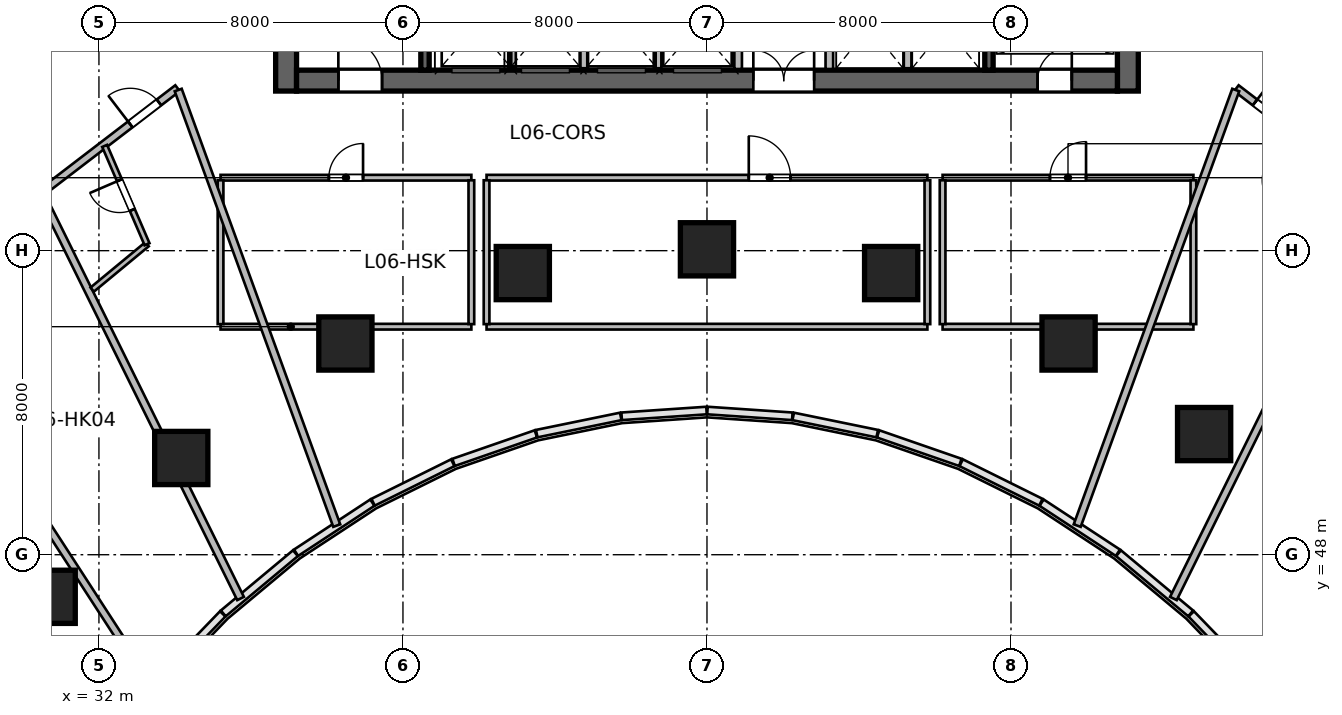
"""IFC4 building model, lengths in metres.
Left out: names, types, materials, properties, quantities, classifications, styles, units other than length and angle.
Written with IfcOpenShell. Run it as: python <this file> out.ifc"""

import sys

from ifc_helpers import new_model, si_unit, direction, frame, frame_2d, origin, origin_2d, place, context, subcontext, project, spatial, rectangle, circle, extrude, source, transform, mapped, element, fill, save


model = new_model("IFC4")
c1 = context("Model", 3, precision=1e-05, world=origin(), true_north=direction((0.0, 1.0)))
c2 = subcontext(c1, "Body", "Model", "MODEL_VIEW")
j1 = project(units=[si_unit("LENGTHUNIT", "METRE"), si_unit("PLANEANGLEUNIT", "RADIAN")], contexts=[c1])
p1 = place(None, origin())
s1 = spatial("IfcSite", under=j1, at=p1, CompositionType="ELEMENT")
p2 = place(p1, origin())
s2 = spatial("IfcBuilding", under=s1, at=p2, CompositionType="ELEMENT")
p3 = place(p2, frame((0.0, 0.0, 35.4)))
s3 = spatial("IfcBuildingStorey", under=s2, at=p3, CompositionType="ELEMENT", Elevation=35.4)
m1 = source(origin(), c2, "Body", "SweptSolid", [
    extrude(rectangle(XDim=12.0, YDim=0.55, at=frame_2d((6.0, 0.0))), origin(), (0.0, 0.0, 1.0), 3.6),
])
for number, where, z_axis, x_axis in (
    (1, (36.925, 60.2, 0.0), (0.0, 0.0, 1.0), (0.0, 1.0, 0.0)),
    (2, (59.075, 60.2, 0.0), (0.0, 0.0, 1.0), (0.0, 1.0, 0.0)),
):
    element("IfcWall", number, at=place(p3, frame(where, z_axis=z_axis, x_axis=x_axis)), inside=s3, PredefinedType="SHEAR", context=c2, shape_type="MappedRepresentation", body=[
        mapped(m1, transform((0.0, 0.0, 0.0), scale=1.0)),
    ])
m2 = source(origin(), c2, "Body", "SweptSolid", [
    extrude(rectangle(XDim=21.6, YDim=0.55, at=frame_2d((10.8, 0.0))), origin(), (0.0, 0.0, 1.0), 3.6),
])
p4 = place(p3, frame((37.2, 60.475, 0.0), z_axis=(0.0, 0.0, 1.0), x_axis=(1.0, 0.0, 0.0)))
e3 = element("IfcWall", 3, at=p4, inside=s3, PredefinedType="SHEAR", context=c2, shape_type="MappedRepresentation", body=[
    mapped(m2, transform((0.0, 0.0, 0.0), scale=1.0)),
])
p5 = place(p4, frame((1.1, 0.0, 0.0)))
e4 = element("IfcOpeningElement", 4, at=p5, cuts=e3, PredefinedType="OPENING", context=c2, shape_type="SweptSolid", body=[
    extrude(rectangle(XDim=1.15, YDim=2.15, at=frame_2d((0.575, 1.075))), frame((0.0, 0.285, 0.0), z_axis=(0.0, -1.0, 0.0), x_axis=(1.0, 0.0, 0.0)), (0.0, 0.0, 1.0), 0.57),
])
p6 = place(p4, frame((19.5, 0.0, 0.0)))
e5 = element("IfcOpeningElement", 5, at=p6, cuts=e3, PredefinedType="OPENING", context=c2, shape_type="SweptSolid", body=[
    extrude(rectangle(XDim=0.9, YDim=2.1, at=frame_2d((0.45, 1.05))), frame((0.0, 0.285, 0.0), z_axis=(0.0, -1.0, 0.0), x_axis=(1.0, 0.0, 0.0)), (0.0, 0.0, 1.0), 0.57),
])
p7 = place(p4, frame((12.02, 0.0, 0.0)))
e6 = element("IfcOpeningElement", 6, at=p7, cuts=e3, PredefinedType="OPENING", context=c2, shape_type="SweptSolid", body=[
    extrude(rectangle(XDim=1.6, YDim=2.15, at=frame_2d((0.8, 1.075))), frame((0.0, 0.285, 0.0), z_axis=(0.0, -1.0, 0.0), x_axis=(1.0, 0.0, 0.0)), (0.0, 0.0, 1.0), 0.57),
])
m3 = source(origin(), c2, "Body", "SweptSolid", [
    extrude(rectangle(XDim=10.9, YDim=0.22, at=frame_2d((5.45, 0.0))), origin(), (0.0, 0.0, 1.0), 3.6),
])
p8 = place(p3, frame((40.58, 60.75, 0.0), z_axis=(0.0, 0.0, 1.0), x_axis=(0.0, 1.0, 0.0)))
e7 = element("IfcWall", 7, at=p8, inside=s3, PredefinedType="SHEAR", context=c2, shape_type="MappedRepresentation", body=[
    mapped(m3, transform((0.0, 0.0, 0.0), scale=1.0)),
])
p9 = place(p3, frame((55.42, 60.75, 0.0), z_axis=(0.0, 0.0, 1.0), x_axis=(0.0, 1.0, 0.0)))
e8 = element("IfcWall", 8, at=p9, inside=s3, PredefinedType="SHEAR", context=c2, shape_type="MappedRepresentation", body=[
    mapped(m3, transform((0.0, 0.0, 0.0), scale=1.0)),
])
p10 = place(p9, frame((9.495, 0.0, 0.0)))
e9 = element("IfcOpeningElement", 9, at=p10, cuts=e8, PredefinedType="OPENING", context=c2, shape_type="SweptSolid", body=[
    extrude(rectangle(XDim=1.15, YDim=2.15, at=frame_2d((0.575, 1.075))), frame((0.0, 0.12, 0.0), z_axis=(0.0, -1.0, 0.0), x_axis=(1.0, 0.0, 0.0)), (0.0, 0.0, 1.0), 0.24),
])
m4 = source(origin(), c2, "Body", "SweptSolid", [
    extrude(circle(Radius=0.7, at=origin_2d()), origin(), (0.0, 0.0, 1.0), 3.6),
])
for number, where, z_axis, x_axis in (
    (10, (30.677, 46.892, 0.0), (0.0, 0.0, 1.0), (-0.571, 0.821, 0.0)),
    (11, (34.166, 50.545, 0.0), (0.0, 0.0, 1.0), (-0.436, 0.9, 0.0)),
    (12, (38.485, 53.558, 0.0), (0.0, 0.0, 1.0), (-0.289, 0.957, 0.0)),
    (13, (43.154, 55.411, 0.0), (0.0, 0.0, 1.0), (-0.143, 0.99, 0.0)),
    (14, (48.0, 56.036, 0.0), (0.0, 0.0, 1.0), (0.0, 1.0, 0.0)),
    (15, (52.846, 55.411, 0.0), (0.0, 0.0, 1.0), (0.143, 0.99, 0.0)),
    (16, (57.515, 53.558, 0.0), (0.0, 0.0, 1.0), (0.289, 0.957, 0.0)),
    (17, (61.082, 51.175, 0.0), (0.0, 0.0, 1.0), (0.409, 0.912, 0.0)),
):
    element("IfcColumn", number, at=place(p3, frame(where, z_axis=z_axis, x_axis=x_axis)), inside=s3, PredefinedType="COLUMN", context=c2, shape_type="MappedRepresentation", body=[
        mapped(m4, transform((0.0, 0.0, 0.0), scale=1.0)),
    ])
m5 = source(origin(), c2, "Body", "SweptSolid", [
    extrude(rectangle(XDim=2.24, YDim=0.2, at=frame_2d((1.12, 0.0))), origin(), (0.0, 0.0, 1.0), 3.36),
])
for number, where, z_axis, x_axis in (
    (18, (48.82, 60.78, 0.0), (0.0, 0.0, 1.0), (0.0, 1.0, 0.0)),
    (19, (51.22, 60.78, 0.0), (0.0, 0.0, 1.0), (0.0, 1.0, 0.0)),
):
    element("IfcWall", number, at=place(p3, frame(where, z_axis=z_axis, x_axis=x_axis)), inside=s3, PredefinedType="SOLIDWALL", context=c2, shape_type="MappedRepresentation", body=[
        mapped(m5, transform((0.0, 0.0, 0.0), scale=1.0)),
    ])
m6 = source(origin(), c2, "Body", "SweptSolid", [
    extrude(rectangle(XDim=2.2, YDim=0.2, at=frame_2d((1.1, 0.0))), origin(), (0.0, 0.0, 1.0), 3.36),
])
for number, where, z_axis, x_axis in (
    (20, (42.87, 60.8, 0.0), (0.0, 0.0, 1.0), (0.0, 1.0, 0.0)),
    (21, (44.77, 60.8, 0.0), (0.0, 0.0, 1.0), (0.0, 1.0, 0.0)),
    (22, (46.7, 60.8, 0.0), (0.0, 0.0, 1.0), (0.0, 1.0, 0.0)),
    (23, (53.28, 60.8, 0.0), (0.0, 0.0, 1.0), (0.0, 1.0, 0.0)),
):
    element("IfcWall", number, at=place(p3, frame(where, z_axis=z_axis, x_axis=x_axis)), inside=s3, PredefinedType="SOLIDWALL", context=c2, shape_type="MappedRepresentation", body=[
        mapped(m6, transform((0.0, 0.0, 0.0), scale=1.0)),
    ])
m7 = source(origin(), c2, "Body", "SweptSolid", [
    extrude(rectangle(XDim=6.6, YDim=0.15, at=frame_2d((3.3, 0.0))), origin(), (0.0, 0.0, 1.0), 2.803),
])
p11 = place(p3, frame((35.2, 54.0, 0.0), z_axis=(0.0, 0.0, 1.0), x_axis=(1.0, 0.0, 0.0)))
e24 = element("IfcWall", 24, at=p11, inside=s3, PredefinedType="PARTITIONING", context=c2, shape_type="MappedRepresentation", body=[
    mapped(m7, transform((0.0, 0.0, 0.0), scale=1.0)),
])
m8 = source(origin(), c2, "Body", "SweptSolid", [
    extrude(rectangle(XDim=6.6, YDim=0.15, at=frame_2d((3.3, 0.0))), origin(), (0.0, 0.0, 1.0), 3.36),
])
p12 = place(p3, frame((35.2, 57.92, 0.0), z_axis=(0.0, 0.0, 1.0), x_axis=(1.0, 0.0, 0.0)))
e25 = element("IfcWall", 25, at=p12, inside=s3, PredefinedType="PARTITIONING", context=c2, shape_type="MappedRepresentation", body=[
    mapped(m8, transform((0.0, 0.0, 0.0), scale=1.0)),
])
p13 = place(p12, frame((2.85, 0.0, 0.0)))
e26 = element("IfcOpeningElement", 26, at=p13, cuts=e25, PredefinedType="OPENING", context=c2, shape_type="SweptSolid", body=[
    extrude(rectangle(XDim=0.9, YDim=2.1, at=frame_2d((0.45, 1.05))), frame((0.0, 0.085, 0.0), z_axis=(0.0, -1.0, 0.0), x_axis=(1.0, 0.0, 0.0)), (0.0, 0.0, 1.0), 0.17),
])
m9 = source(origin(), c2, "Body", "SweptSolid", [
    extrude(rectangle(XDim=3.785, YDim=0.15, at=frame_2d((1.893, 0.0))), origin(), (0.0, 0.0, 1.0), 3.36),
])
for number, where, z_axis, x_axis in (
    (27, (35.2, 54.067, 0.0), (0.0, 0.0, 1.0), (0.0, 1.0, 0.0)),
    (28, (41.8, 54.067, 0.0), (0.0, 0.0, 1.0), (0.0, 1.0, 0.0)),
):
    element("IfcWall", number, at=place(p3, frame(where, z_axis=z_axis, x_axis=x_axis)), inside=s3, PredefinedType="PARTITIONING", context=c2, shape_type="MappedRepresentation", body=[
        mapped(m9, transform((0.0, 0.0, 0.0), scale=1.0)),
    ])
m10 = source(origin(), c2, "Body", "SweptSolid", [
    extrude(rectangle(XDim=11.6, YDim=0.15, at=frame_2d((5.8, 0.0))), origin(), (0.0, 0.0, 1.0), 3.36),
])
p14 = place(p3, frame((42.2, 54.0, 0.0), z_axis=(0.0, 0.0, 1.0), x_axis=(1.0, 0.0, 0.0)))
e29 = element("IfcWall", 29, at=p14, inside=s3, PredefinedType="PARTITIONING", context=c2, shape_type="MappedRepresentation", body=[
    mapped(m10, transform((0.0, 0.0, 0.0), scale=1.0)),
])
p15 = place(p3, frame((42.2, 57.92, 0.0), z_axis=(0.0, 0.0, 1.0), x_axis=(1.0, 0.0, 0.0)))
e30 = element("IfcWall", 30, at=p15, inside=s3, PredefinedType="PARTITIONING", context=c2, shape_type="MappedRepresentation", body=[
    mapped(m10, transform((0.0, 0.0, 0.0), scale=1.0)),
])
p16 = place(p15, frame((6.9, 0.0, 0.0)))
e31 = element("IfcOpeningElement", 31, at=p16, cuts=e30, PredefinedType="OPENING", context=c2, shape_type="SweptSolid", body=[
    extrude(rectangle(XDim=1.1, YDim=2.15, at=frame_2d((0.55, 1.075))), frame((0.0, 0.085, 0.0), z_axis=(0.0, -1.0, 0.0), x_axis=(1.0, 0.0, 0.0)), (0.0, 0.0, 1.0), 0.17),
])
for number, where, z_axis, x_axis in (
    (32, (42.2, 54.067, 0.0), (0.0, 0.0, 1.0), (0.0, 1.0, 0.0)),
    (33, (53.8, 54.067, 0.0), (0.0, 0.0, 1.0), (0.0, 1.0, 0.0)),
):
    element("IfcWall", number, at=place(p3, frame(where, z_axis=z_axis, x_axis=x_axis)), inside=s3, PredefinedType="PARTITIONING", context=c2, shape_type="MappedRepresentation", body=[
        mapped(m9, transform((0.0, 0.0, 0.0), scale=1.0)),
    ])
p17 = place(p3, frame((54.2, 54.0, 0.0), z_axis=(0.0, 0.0, 1.0), x_axis=(1.0, 0.0, 0.0)))
e34 = element("IfcWall", 34, at=p17, inside=s3, PredefinedType="PARTITIONING", context=c2, shape_type="MappedRepresentation", body=[
    mapped(m7, transform((0.0, 0.0, 0.0), scale=1.0)),
])
p18 = place(p3, frame((54.2, 57.92, 0.0), z_axis=(0.0, 0.0, 1.0), x_axis=(1.0, 0.0, 0.0)))
e35 = element("IfcWall", 35, at=p18, inside=s3, PredefinedType="PARTITIONING", context=c2, shape_type="MappedRepresentation", body=[
    mapped(m8, transform((0.0, 0.0, 0.0), scale=1.0)),
])
p19 = place(p18, frame((2.825, 0.0, 0.0)))
e36 = element("IfcOpeningElement", 36, at=p19, cuts=e35, PredefinedType="OPENING", context=c2, shape_type="SweptSolid", body=[
    extrude(rectangle(XDim=0.95, YDim=2.1, at=frame_2d((0.475, 1.05))), frame((0.0, 0.085, 0.0), z_axis=(0.0, -1.0, 0.0), x_axis=(1.0, 0.0, 0.0)), (0.0, 0.0, 1.0), 0.17),
])
for number, where, z_axis, x_axis in (
    (37, (54.2, 54.067, 0.0), (0.0, 0.0, 1.0), (0.0, 1.0, 0.0)),
    (38, (60.8, 54.067, 0.0), (0.0, 0.0, 1.0), (0.0, 1.0, 0.0)),
):
    element("IfcWall", number, at=place(p3, frame(where, z_axis=z_axis, x_axis=x_axis)), inside=s3, PredefinedType="PARTITIONING", context=c2, shape_type="MappedRepresentation", body=[
        mapped(m9, transform((0.0, 0.0, 0.0), scale=1.0)),
    ])
m11 = source(origin(), c2, "Body", "SweptSolid", [
    extrude(rectangle(XDim=11.053, YDim=0.195, at=frame_2d((5.527, 0.0))), origin(), (0.0, 0.0, 1.0), 3.36),
])
p20 = place(p3, frame((31.466, 41.949, 0.0), z_axis=(0.0, 0.0, 1.0), x_axis=(-0.638131235571, 0.769927611005, 0.0)))
e39 = element("IfcWall", 39, at=p20, inside=s3, PredefinedType="PARTITIONING", context=c2, shape_type="MappedRepresentation", body=[
    mapped(m11, transform((0.0, 0.0, 0.0), scale=1.0)),
])
m12 = source(origin(), c2, "Body", "SweptSolid", [
    extrude(rectangle(XDim=11.429, YDim=0.195, at=frame_2d((5.714, 0.0))), origin(), (0.0, 0.0, 1.0), 3.36),
])
p21 = place(p3, frame((33.396, 44.511, 0.0), z_axis=(0.0, 0.0, 1.0), x_axis=(-0.544215487077, 0.838945471187, 0.0)))
e40 = element("IfcWall", 40, at=p21, inside=s3, PredefinedType="PARTITIONING", context=c2, shape_type="MappedRepresentation", body=[
    mapped(m12, transform((0.0, 0.0, 0.0), scale=1.0)),
])
m13 = source(origin(), c2, "Body", "SweptSolid", [
    extrude(rectangle(XDim=11.844, YDim=0.195, at=frame_2d((5.922, 0.0))), origin(), (0.0, 0.0, 1.0), 2.644),
])
p22 = place(p3, frame((35.727, 46.848, 0.0), z_axis=(0.0, 0.0, 1.0), x_axis=(-0.442871152218, 0.896585267854, 0.0)))
e41 = element("IfcWall", 41, at=p22, inside=s3, PredefinedType="PARTITIONING", context=c2, shape_type="MappedRepresentation", body=[
    mapped(m13, transform((0.0, 0.0, 0.0), scale=1.0)),
])
m14 = source(origin(), c2, "Body", "SweptSolid", [
    extrude(rectangle(XDim=4.895, YDim=0.195, at=frame_2d((2.447, 0.0))), origin(), (0.0, 0.0, 1.0), 3.36),
])
p23 = place(p3, frame((29.113, 60.238, 0.0), z_axis=(0.0, 0.0, 1.0), x_axis=(0.793896075849, 0.608053468661, 0.0)))
e42 = element("IfcWall", 42, at=p23, inside=s3, PredefinedType="PARTITIONING", context=c2, shape_type="MappedRepresentation", body=[
    mapped(m14, transform((0.0, 0.0, 0.0), scale=1.0)),
])
p24 = place(p23, frame((3.245, 0.0, 0.0)))
e43 = element("IfcOpeningElement", 43, at=p24, cuts=e42, PredefinedType="OPENING", context=c2, shape_type="SweptSolid", body=[
    extrude(rectangle(XDim=0.95, YDim=2.15, at=frame_2d((0.475, 1.075))), frame((0.0, 0.107, 0.0), z_axis=(0.0, -1.0, 0.0), x_axis=(1.0, 0.0, 0.0)), (0.0, 0.0, 1.0), 0.215),
])
m15 = source(origin(), c2, "Body", "SweptSolid", [
    extrude(rectangle(XDim=4.546, YDim=0.195, at=frame_2d((2.273, 0.0))), origin(), (0.0, 0.0, 1.0), 3.36),
])
p25 = place(p3, frame((30.459, 57.511, 0.0), z_axis=(0.0, 0.0, 1.0), x_axis=(0.793907931297, 0.608037989457, 0.0)))
e44 = element("IfcWall", 44, at=p25, inside=s3, PredefinedType="PARTITIONING", context=c2, shape_type="MappedRepresentation", body=[
    mapped(m15, transform((0.0, 0.0, 0.0), scale=1.0)),
])
p26 = place(p25, frame((2.98, 0.0, 0.0)))
e45 = element("IfcOpeningElement", 45, at=p26, cuts=e44, PredefinedType="OPENING", context=c2, shape_type="SweptSolid", body=[
    extrude(rectangle(XDim=0.95, YDim=2.15, at=frame_2d((0.475, 1.075))), frame((0.0, 0.107, 0.0), z_axis=(0.0, -1.0, 0.0), x_axis=(1.0, 0.0, 0.0)), (0.0, 0.0, 1.0), 0.215),
])
m16 = source(origin(), c2, "Body", "SweptSolid", [
    extrude(rectangle(XDim=12.196, YDim=0.195, at=frame_2d((6.098, 0.0))), origin(), (0.0, 0.0, 1.0), 3.36),
])
p27 = place(p3, frame((38.258, 48.766, 0.0), z_axis=(0.0, 0.0, 1.0), x_axis=(-0.342022711534, 0.939691686031, 0.0)))
e46 = element("IfcWall", 46, at=p27, inside=s3, PredefinedType="PARTITIONING", context=c2, shape_type="MappedRepresentation", body=[
    mapped(m16, transform((0.0, 0.0, 0.0), scale=1.0)),
])
m17 = source(origin(), c2, "Body", "SweptSolid", [
    extrude(rectangle(XDim=1.873, YDim=0.14, at=frame_2d((0.937, 0.0))), origin(), (0.0, 0.0, 1.0), 3.36),
])
p28 = place(p3, frame((31.823, 54.976, 0.0), z_axis=(0.0, 0.0, 1.0), x_axis=(0.77069451688, 0.637204803537, 0.0)))
e47 = element("IfcWall", 47, at=p28, inside=s3, PredefinedType="PARTITIONING", context=c2, shape_type="MappedRepresentation", body=[
    mapped(m17, transform((0.0, 0.0, 0.0), scale=1.0)),
])
m18 = source(origin(), c2, "Body", "SweptSolid", [
    extrude(rectangle(XDim=2.817, YDim=0.14, at=frame_2d((1.409, 0.0))), origin(), (0.0, 0.0, 1.0), 3.36),
])
p29 = place(p3, frame((33.266, 56.169, 0.0), z_axis=(0.0, 0.0, 1.0), x_axis=(-0.395999429727, 0.918250756415, 0.0)))
e48 = element("IfcWall", 48, at=p29, inside=s3, PredefinedType="PARTITIONING", context=c2, shape_type="MappedRepresentation", body=[
    mapped(m18, transform((0.0, 0.0, 0.0), scale=1.0)),
])
p30 = place(p29, frame((0.984, 0.0, 0.0)))
e49 = element("IfcOpeningElement", 49, at=p30, cuts=e48, PredefinedType="OPENING", context=c2, shape_type="SweptSolid", body=[
    extrude(rectangle(XDim=0.85, YDim=2.05, at=frame_2d((0.425, 1.025))), frame((0.0, 0.08, 0.0), z_axis=(0.0, -1.0, 0.0), x_axis=(1.0, 0.0, 0.0)), (0.0, 0.0, 1.0), 0.16),
])
p31 = place(p3, frame((61.931, 60.275, 0.0), z_axis=(0.0, 0.0, 1.0), x_axis=(0.793907931297, -0.608037989457, 0.0)))
e50 = element("IfcWall", 50, at=p31, inside=s3, PredefinedType="PARTITIONING", context=c2, shape_type="MappedRepresentation", body=[
    mapped(m15, transform((0.0, 0.0, 0.0), scale=1.0)),
])
p32 = place(p31, frame((0.616, 0.0, 0.0)))
e51 = element("IfcOpeningElement", 51, at=p32, cuts=e50, PredefinedType="OPENING", context=c2, shape_type="SweptSolid", body=[
    extrude(rectangle(XDim=0.95, YDim=2.15, at=frame_2d((0.475, 1.075))), frame((0.0, 0.107, 0.0), z_axis=(0.0, -1.0, 0.0), x_axis=(1.0, 0.0, 0.0)), (0.0, 0.0, 1.0), 0.215),
])
p33 = place(p3, frame((57.742, 48.766, 0.0), z_axis=(0.0, 0.0, 1.0), x_axis=(0.342022711534, 0.939691686031, 0.0)))
e52 = element("IfcWall", 52, at=p33, inside=s3, PredefinedType="PARTITIONING", context=c2, shape_type="MappedRepresentation", body=[
    mapped(m16, transform((0.0, 0.0, 0.0), scale=1.0)),
])
m19 = source(origin(), c2, "Body", "SweptSolid", [
    extrude(rectangle(XDim=11.844, YDim=0.195, at=frame_2d((5.922, 0.0))), origin(), (0.0, 0.0, 1.0), 3.36),
])
p34 = place(p3, frame((60.273, 46.848, 0.0), z_axis=(0.0, 0.0, 1.0), x_axis=(0.442871152218, 0.896585267854, 0.0)))
e53 = element("IfcWall", 53, at=p34, inside=s3, PredefinedType="PARTITIONING", context=c2, shape_type="MappedRepresentation", body=[
    mapped(m19, transform((0.0, 0.0, 0.0), scale=1.0)),
])
p35 = place(p3, frame((62.604, 44.511, 0.0), z_axis=(0.0, 0.0, 1.0), x_axis=(0.544215487077, 0.838945471187, 0.0)))
e54 = element("IfcWall", 54, at=p35, inside=s3, PredefinedType="PARTITIONING", context=c2, shape_type="MappedRepresentation", body=[
    mapped(m12, transform((0.0, 0.0, 0.0), scale=1.0)),
])
m20 = source(origin(), c2, "Body", "SweptSolid", [
    extrude(rectangle(XDim=1.15, YDim=2.15, at=frame_2d((0.575, 1.075))), frame((0.0, 0.025, 0.0), z_axis=(0.0, -1.0, 0.0), x_axis=(1.0, 0.0, 0.0)), (0.0, 0.0, 1.0), 0.05),
])
p36 = place(p5, origin())
e55 = element("IfcDoor", 55, at=p36, inside=s3, OperationType="SINGLE_SWING_LEFT", PredefinedType="DOOR", context=c2, shape_type="MappedRepresentation", body=[
    mapped(m20, transform((0.0, 0.0, 0.0), scale=1.0)),
])
fill(e4, e55)
m21 = source(origin(), c2, "Body", "SweptSolid", [
    extrude(rectangle(XDim=0.9, YDim=2.1, at=frame_2d((0.45, 1.05))), frame((0.0, 0.025, 0.0), z_axis=(0.0, -1.0, 0.0), x_axis=(1.0, 0.0, 0.0)), (0.0, 0.0, 1.0), 0.05),
])
p37 = place(p6, origin())
e56 = element("IfcDoor", 56, at=p37, inside=s3, OperationType="SINGLE_SWING_RIGHT", PredefinedType="DOOR", context=c2, shape_type="MappedRepresentation", body=[
    mapped(m21, transform((0.0, 0.0, 0.0), scale=1.0)),
])
fill(e5, e56)
m22 = source(origin(), c2, "Body", "SweptSolid", [
    extrude(rectangle(XDim=1.6, YDim=2.15, at=frame_2d((0.8, 1.075))), frame((0.0, 0.025, 0.0), z_axis=(0.0, -1.0, 0.0), x_axis=(1.0, 0.0, 0.0)), (0.0, 0.0, 1.0), 0.05),
])
p38 = place(p7, origin())
e57 = element("IfcDoor", 57, at=p38, inside=s3, OperationType="DOUBLE_DOOR_SINGLE_SWING", PredefinedType="DOOR", context=c2, shape_type="MappedRepresentation", body=[
    mapped(m22, transform((0.0, 0.0, 0.0), scale=1.0)),
])
fill(e6, e57)
p39 = place(p13, origin())
e58 = element("IfcDoor", 58, at=p39, inside=s3, OperationType="SINGLE_SWING_RIGHT", PredefinedType="DOOR", context=c2, shape_type="MappedRepresentation", body=[
    mapped(m21, transform((0.0, 0.0, 0.0), scale=1.0)),
])
fill(e26, e58)
m23 = source(origin(), c2, "Body", "SweptSolid", [
    extrude(rectangle(XDim=1.1, YDim=2.15, at=frame_2d((0.55, 1.075))), frame((0.0, 0.025, 0.0), z_axis=(0.0, -1.0, 0.0), x_axis=(1.0, 0.0, 0.0)), (0.0, 0.0, 1.0), 0.05),
])
p40 = place(p16, origin())
e59 = element("IfcDoor", 59, at=p40, inside=s3, OperationType="SINGLE_SWING_LEFT", PredefinedType="DOOR", context=c2, shape_type="MappedRepresentation", body=[
    mapped(m23, transform((0.0, 0.0, 0.0), scale=1.0)),
])
fill(e31, e59)
m24 = source(origin(), c2, "Body", "SweptSolid", [
    extrude(rectangle(XDim=0.95, YDim=2.1, at=frame_2d((0.475, 1.05))), frame((0.0, 0.025, 0.0), z_axis=(0.0, -1.0, 0.0), x_axis=(1.0, 0.0, 0.0)), (0.0, 0.0, 1.0), 0.05),
])
p41 = place(p19, origin())
e60 = element("IfcDoor", 60, at=p41, inside=s3, OperationType="SINGLE_SWING_RIGHT", PredefinedType="DOOR", context=c2, shape_type="MappedRepresentation", body=[
    mapped(m24, transform((0.0, 0.0, 0.0), scale=1.0)),
])
fill(e36, e60)
m25 = source(origin(), c2, "Body", "SweptSolid", [
    extrude(rectangle(XDim=0.95, YDim=2.15, at=frame_2d((0.475, 1.075))), frame((0.0, 0.025, 0.0), z_axis=(0.0, -1.0, 0.0), x_axis=(1.0, 0.0, 0.0)), (0.0, 0.0, 1.0), 0.05),
])
p42 = place(p26, origin())
e61 = element("IfcDoor", 61, at=p42, inside=s3, OperationType="SINGLE_SWING_LEFT", PredefinedType="DOOR", context=c2, shape_type="MappedRepresentation", body=[
    mapped(m25, transform((0.0, 0.0, 0.0), scale=1.0)),
])
fill(e45, e61)
m26 = source(origin(), c2, "Body", "SweptSolid", [
    extrude(rectangle(XDim=0.85, YDim=2.05, at=frame_2d((0.425, 1.025))), frame((0.0, 0.025, 0.0), z_axis=(0.0, -1.0, 0.0), x_axis=(1.0, 0.0, 0.0)), (0.0, 0.0, 1.0), 0.05),
])
p43 = place(p30, origin())
e62 = element("IfcDoor", 62, at=p43, inside=s3, OperationType="SINGLE_SWING_RIGHT", PredefinedType="DOOR", context=c2, shape_type="MappedRepresentation", body=[
    mapped(m26, transform((0.0, 0.0, 0.0), scale=1.0)),
])
fill(e49, e62)
p44 = place(p32, origin())
e63 = element("IfcDoor", 63, at=p44, inside=s3, OperationType="SINGLE_SWING_LEFT", PredefinedType="DOOR", context=c2, shape_type="MappedRepresentation", body=[
    mapped(m25, transform((0.0, 0.0, 0.0), scale=1.0)),
])
fill(e51, e63)
save(model, sys.argv[1])
